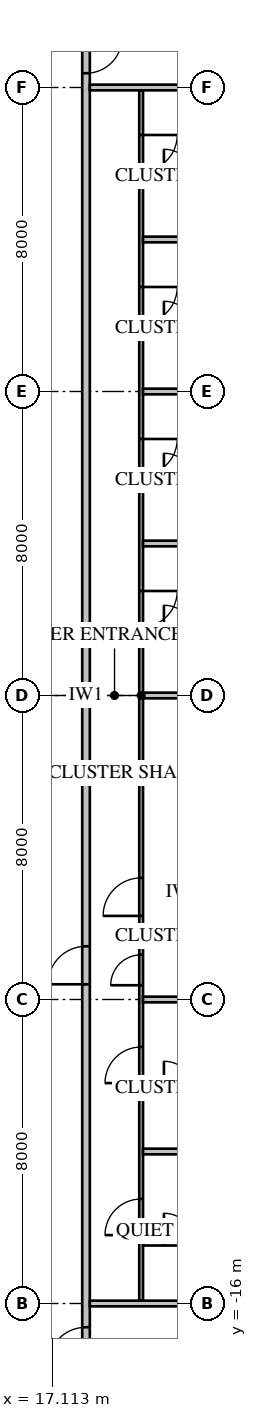
"""IFC4 building model, lengths in metres.
Left out: names, types, materials, properties, quantities, classifications, styles, units other than length and angle.
Written with IfcOpenShell. Run it as: python <this file> out.ifc"""

import sys

from ifc_helpers import new_model, si_unit, direction, frame, frame_2d, origin, place, context, subcontext, project, spatial, rectangle, extrude, element, fill, save


model = new_model("IFC4")
c1 = context("Model", 3, precision=1e-05, world=origin(), true_north=direction((0.0, 1.0)))
c2 = subcontext(c1, "Body", "Model", "MODEL_VIEW")
j1 = project(units=[si_unit("LENGTHUNIT", "METRE"), si_unit("PLANEANGLEUNIT", "RADIAN")], contexts=[c1])
p1 = place(None, origin())
s1 = spatial("IfcSite", under=j1, at=p1, CompositionType="ELEMENT")
p2 = place(p1, origin())
s2 = spatial("IfcBuilding", under=s1, at=p2, CompositionType="ELEMENT")
p3 = place(p2, frame((0.0, 0.0, 27.55)))
s3 = spatial("IfcBuildingStorey", under=s2, at=p3, CompositionType="ELEMENT", Elevation=27.55)
p4 = place(p3, frame((18.0, -18.0, 0.0), z_axis=(0.0, 0.0, 1.0), x_axis=(0.0, 1.0, 0.0)))
e1 = element("IfcWall", 1, at=p4, inside=s3, PredefinedType="PARTITIONING", context=c2, shape_type="SweptSolid", body=[
    extrude(rectangle(XDim=36.0, YDim=0.2, at=frame_2d((18.0, 0.0))), origin(), (0.0, 0.0, 1.0), 3.65),
])
p5 = place(p4, frame((10.4, 0.0, 0.0)))
e2 = element("IfcOpeningElement", 2, at=p5, cuts=e1, PredefinedType="OPENING", context=c2, shape_type="SweptSolid", body=[
    extrude(rectangle(XDim=1.0, YDim=2.1, at=frame_2d((0.5, 1.05))), frame((0.0, 0.12, 0.0), z_axis=(0.0, -1.0, 0.0), x_axis=(1.0, 0.0, 0.0)), (0.0, 0.0, 1.0), 0.24),
])
p6 = place(p4, frame((0.375, 0.0, 0.0)))
e3 = element("IfcOpeningElement", 3, at=p6, cuts=e1, PredefinedType="OPENING", context=c2, shape_type="SweptSolid", body=[
    extrude(rectangle(XDim=1.0, YDim=2.1, at=frame_2d((0.5, 1.05))), frame((0.0, 0.12, 0.0), z_axis=(0.0, -1.0, 0.0), x_axis=(1.0, 0.0, 0.0)), (0.0, 0.0, 1.0), 0.24),
])
p7 = place(p4, frame((34.375, 0.0, 0.0)))
e4 = element("IfcOpeningElement", 4, at=p7, cuts=e1, PredefinedType="OPENING", context=c2, shape_type="SweptSolid", body=[
    extrude(rectangle(XDim=0.95, YDim=2.1, at=frame_2d((0.475, 1.05))), frame((0.0, 0.12, 0.0), z_axis=(0.0, -1.0, 0.0), x_axis=(1.0, 0.0, 0.0)), (0.0, 0.0, 1.0), 0.24),
])
p8 = place(p3, frame((19.45, -15.925, 0.0), z_axis=(0.0, 0.0, 1.0), x_axis=(0.0, 1.0, 0.0)))
e5 = element("IfcWall", 5, at=p8, inside=s3, PredefinedType="PARTITIONING", context=c2, shape_type="SweptSolid", body=[
    extrude(rectangle(XDim=31.85, YDim=0.1, at=frame_2d((15.925, 0.0))), origin(), (0.0, 0.0, 1.0), 3.65),
])
p9 = place(p8, frame((10.125, 0.0, 0.0)))
e6 = element("IfcOpeningElement", 6, at=p9, cuts=e5, PredefinedType="OPENING", context=c2, shape_type="SweptSolid", body=[
    extrude(rectangle(XDim=1.0, YDim=2.1, at=frame_2d((0.5, 1.05))), frame((0.0, 0.07, 0.0), z_axis=(0.0, -1.0, 0.0), x_axis=(1.0, 0.0, 0.0)), (0.0, 0.0, 1.0), 0.14),
])
p10 = place(p8, frame((8.3, 0.0, 0.0)))
e7 = element("IfcOpeningElement", 7, at=p10, cuts=e5, PredefinedType="OPENING", context=c2, shape_type="SweptSolid", body=[
    extrude(rectangle(XDim=0.8, YDim=2.1, at=frame_2d((0.4, 1.05))), frame((0.0, 0.07, 0.0), z_axis=(0.0, -1.0, 0.0), x_axis=(1.0, 0.0, 0.0)), (0.0, 0.0, 1.0), 0.14),
])
p11 = place(p8, frame((1.725, 0.0, 0.0)))
e8 = element("IfcOpeningElement", 8, at=p11, cuts=e5, PredefinedType="OPENING", context=c2, shape_type="SweptSolid", body=[
    extrude(rectangle(XDim=0.95, YDim=2.1, at=frame_2d((0.475, 1.05))), frame((0.0, 0.07, 0.0), z_axis=(0.0, -1.0, 0.0), x_axis=(1.0, 0.0, 0.0)), (0.0, 0.0, 1.0), 0.14),
])
p12 = place(p8, frame((5.725, 0.0, 0.0)))
e9 = element("IfcOpeningElement", 9, at=p12, cuts=e5, PredefinedType="OPENING", context=c2, shape_type="SweptSolid", body=[
    extrude(rectangle(XDim=0.95, YDim=2.1, at=frame_2d((0.475, 1.05))), frame((0.0, 0.07, 0.0), z_axis=(0.0, -1.0, 0.0), x_axis=(1.0, 0.0, 0.0)), (0.0, 0.0, 1.0), 0.14),
])
p13 = place(p8, frame((17.725, 0.0, 0.0)))
e10 = element("IfcOpeningElement", 10, at=p13, cuts=e5, PredefinedType="OPENING", context=c2, shape_type="SweptSolid", body=[
    extrude(rectangle(XDim=0.95, YDim=2.1, at=frame_2d((0.475, 1.05))), frame((0.0, 0.07, 0.0), z_axis=(0.0, -1.0, 0.0), x_axis=(1.0, 0.0, 0.0)), (0.0, 0.0, 1.0), 0.14),
])
p14 = place(p8, frame((21.725, 0.0, 0.0)))
e11 = element("IfcOpeningElement", 11, at=p14, cuts=e5, PredefinedType="OPENING", context=c2, shape_type="SweptSolid", body=[
    extrude(rectangle(XDim=0.95, YDim=2.1, at=frame_2d((0.475, 1.05))), frame((0.0, 0.07, 0.0), z_axis=(0.0, -1.0, 0.0), x_axis=(1.0, 0.0, 0.0)), (0.0, 0.0, 1.0), 0.14),
])
p15 = place(p8, frame((25.725, 0.0, 0.0)))
e12 = element("IfcOpeningElement", 12, at=p15, cuts=e5, PredefinedType="OPENING", context=c2, shape_type="SweptSolid", body=[
    extrude(rectangle(XDim=0.95, YDim=2.1, at=frame_2d((0.475, 1.05))), frame((0.0, 0.07, 0.0), z_axis=(0.0, -1.0, 0.0), x_axis=(1.0, 0.0, 0.0)), (0.0, 0.0, 1.0), 0.14),
])
p16 = place(p8, frame((29.725, 0.0, 0.0)))
e13 = element("IfcOpeningElement", 13, at=p16, cuts=e5, PredefinedType="OPENING", context=c2, shape_type="SweptSolid", body=[
    extrude(rectangle(XDim=0.95, YDim=2.1, at=frame_2d((0.475, 1.05))), frame((0.0, 0.07, 0.0), z_axis=(0.0, -1.0, 0.0), x_axis=(1.0, 0.0, 0.0)), (0.0, 0.0, 1.0), 0.14),
])
p17 = place(p3, frame((19.5, -6.275, 0.0), z_axis=(0.0, 0.0, 1.0), x_axis=(1.0, 0.0, 0.0)))
e14 = element("IfcWall", 14, at=p17, inside=s3, PredefinedType="PARTITIONING", context=c2, shape_type="SweptSolid", body=[
    extrude(rectangle(XDim=2.1, YDim=0.1, at=frame_2d((1.05, 0.0))), origin(), (0.0, 0.0, 1.0), 3.65),
])
p18 = place(p3, frame((18.1, -16.0, 0.0), z_axis=(0.0, 0.0, 1.0), x_axis=(1.0, 0.0, 0.0)))
e15 = element("IfcWall", 15, at=p18, inside=s3, PredefinedType="PARTITIONING", context=c2, shape_type="SweptSolid", body=[
    extrude(rectangle(XDim=6.589, YDim=0.15, at=frame_2d((3.295, 0.0))), origin(), (0.0, 0.0, 1.0), 3.65),
])
for number, where, z_axis, x_axis in (
    (16, (19.5, -12.0, 0.0), (0.0, 0.0, 1.0), (1.0, 0.0, 0.0)),
    (17, (19.5, -8.0, 0.0), (0.0, 0.0, 1.0), (1.0, 0.0, 0.0)),
):
    element("IfcWall", number, at=place(p3, frame(where, z_axis=z_axis, x_axis=x_axis)), inside=s3, PredefinedType="PARTITIONING", context=c2, shape_type="SweptSolid", body=[
        extrude(rectangle(XDim=5.2, YDim=0.15, at=frame_2d((2.6, 0.0))), origin(), (0.0, 0.0, 1.0), 3.65),
    ])
p19 = place(p3, frame((19.5, 0.0, 0.0), z_axis=(0.0, 0.0, 1.0), x_axis=(1.0, 0.0, 0.0)))
e18 = element("IfcWall", 18, at=p19, inside=s3, PredefinedType="PARTITIONING", context=c2, shape_type="SweptSolid", body=[
    extrude(rectangle(XDim=5.2, YDim=0.15, at=frame_2d((2.6, 0.0))), origin(), (0.0, 0.0, 1.0), 2.957),
])
for number, where, z_axis, x_axis in (
    (19, (19.5, 4.0, 0.0), (0.0, 0.0, 1.0), (1.0, 0.0, 0.0)),
    (20, (19.5, 8.0, 0.0), (0.0, 0.0, 1.0), (1.0, 0.0, 0.0)),
    (21, (19.5, 12.0, 0.0), (0.0, 0.0, 1.0), (1.0, 0.0, 0.0)),
):
    element("IfcWall", number, at=place(p3, frame(where, z_axis=z_axis, x_axis=x_axis)), inside=s3, PredefinedType="PARTITIONING", context=c2, shape_type="SweptSolid", body=[
        extrude(rectangle(XDim=5.2, YDim=0.15, at=frame_2d((2.6, 0.0))), origin(), (0.0, 0.0, 1.0), 3.65),
    ])
p20 = place(p3, frame((18.1, 16.0, 0.0), z_axis=(0.0, 0.0, 1.0), x_axis=(1.0, 0.0, 0.0)))
e22 = element("IfcWall", 22, at=p20, inside=s3, PredefinedType="PARTITIONING", context=c2, shape_type="SweptSolid", body=[
    extrude(rectangle(XDim=6.589, YDim=0.15, at=frame_2d((3.295, 0.0))), origin(), (0.0, 0.0, 1.0), 3.65),
])
p21 = place(p3, frame((19.5, -14.425, 0.0), z_axis=(0.0, 0.0, 1.0), x_axis=(1.0, 0.0, 0.0)))
e23 = element("IfcWall", 23, at=p21, inside=s3, PredefinedType="PARTITIONING", context=c2, shape_type="SweptSolid", body=[
    extrude(rectangle(XDim=2.7, YDim=0.1, at=frame_2d((1.35, 0.0))), origin(), (0.0, 0.0, 1.0), 3.65),
])
p22 = place(p21, frame((0.55, 0.0, 0.0)))
e24 = element("IfcOpeningElement", 24, at=p22, cuts=e23, PredefinedType="OPENING", context=c2, shape_type="SweptSolid", body=[
    extrude(rectangle(XDim=0.8, YDim=2.1, at=frame_2d((0.4, 1.05))), frame((0.0, 0.07, 0.0), z_axis=(0.0, -1.0, 0.0), x_axis=(1.0, 0.0, 0.0)), (0.0, 0.0, 1.0), 0.14),
])
p23 = place(p3, frame((19.5, -10.425, 0.0), z_axis=(0.0, 0.0, 1.0), x_axis=(1.0, 0.0, 0.0)))
e25 = element("IfcWall", 25, at=p23, inside=s3, PredefinedType="PARTITIONING", context=c2, shape_type="SweptSolid", body=[
    extrude(rectangle(XDim=2.7, YDim=0.1, at=frame_2d((1.35, 0.0))), origin(), (0.0, 0.0, 1.0), 3.65),
])
p24 = place(p23, frame((0.55, 0.0, 0.0)))
e26 = element("IfcOpeningElement", 26, at=p24, cuts=e25, PredefinedType="OPENING", context=c2, shape_type="SweptSolid", body=[
    extrude(rectangle(XDim=0.8, YDim=2.1, at=frame_2d((0.4, 1.05))), frame((0.0, 0.07, 0.0), z_axis=(0.0, -1.0, 0.0), x_axis=(1.0, 0.0, 0.0)), (0.0, 0.0, 1.0), 0.14),
])
p25 = place(p3, frame((19.5, 1.575, 0.0), z_axis=(0.0, 0.0, 1.0), x_axis=(1.0, 0.0, 0.0)))
e27 = element("IfcWall", 27, at=p25, inside=s3, PredefinedType="PARTITIONING", context=c2, shape_type="SweptSolid", body=[
    extrude(rectangle(XDim=2.7, YDim=0.1, at=frame_2d((1.35, 0.0))), origin(), (0.0, 0.0, 1.0), 3.65),
])
p26 = place(p25, frame((0.55, 0.0, 0.0)))
e28 = element("IfcOpeningElement", 28, at=p26, cuts=e27, PredefinedType="OPENING", context=c2, shape_type="SweptSolid", body=[
    extrude(rectangle(XDim=0.8, YDim=2.1, at=frame_2d((0.4, 1.05))), frame((0.0, 0.07, 0.0), z_axis=(0.0, -1.0, 0.0), x_axis=(1.0, 0.0, 0.0)), (0.0, 0.0, 1.0), 0.14),
])
p27 = place(p3, frame((19.5, 5.575, 0.0), z_axis=(0.0, 0.0, 1.0), x_axis=(1.0, 0.0, 0.0)))
e29 = element("IfcWall", 29, at=p27, inside=s3, PredefinedType="PARTITIONING", context=c2, shape_type="SweptSolid", body=[
    extrude(rectangle(XDim=2.7, YDim=0.1, at=frame_2d((1.35, 0.0))), origin(), (0.0, 0.0, 1.0), 3.65),
])
p28 = place(p27, frame((0.55, 0.0, 0.0)))
e30 = element("IfcOpeningElement", 30, at=p28, cuts=e29, PredefinedType="OPENING", context=c2, shape_type="SweptSolid", body=[
    extrude(rectangle(XDim=0.8, YDim=2.1, at=frame_2d((0.4, 1.05))), frame((0.0, 0.07, 0.0), z_axis=(0.0, -1.0, 0.0), x_axis=(1.0, 0.0, 0.0)), (0.0, 0.0, 1.0), 0.14),
])
p29 = place(p3, frame((19.5, 9.575, 0.0), z_axis=(0.0, 0.0, 1.0), x_axis=(1.0, 0.0, 0.0)))
e31 = element("IfcWall", 31, at=p29, inside=s3, PredefinedType="PARTITIONING", context=c2, shape_type="SweptSolid", body=[
    extrude(rectangle(XDim=2.7, YDim=0.1, at=frame_2d((1.35, 0.0))), origin(), (0.0, 0.0, 1.0), 3.65),
])
p30 = place(p29, frame((0.55, 0.0, 0.0)))
e32 = element("IfcOpeningElement", 32, at=p30, cuts=e31, PredefinedType="OPENING", context=c2, shape_type="SweptSolid", body=[
    extrude(rectangle(XDim=0.8, YDim=2.1, at=frame_2d((0.4, 1.05))), frame((0.0, 0.07, 0.0), z_axis=(0.0, -1.0, 0.0), x_axis=(1.0, 0.0, 0.0)), (0.0, 0.0, 1.0), 0.14),
])
p31 = place(p3, frame((19.5, 13.575, 0.0), z_axis=(0.0, 0.0, 1.0), x_axis=(1.0, 0.0, 0.0)))
e33 = element("IfcWall", 33, at=p31, inside=s3, PredefinedType="PARTITIONING", context=c2, shape_type="SweptSolid", body=[
    extrude(rectangle(XDim=2.7, YDim=0.1, at=frame_2d((1.35, 0.0))), origin(), (0.0, 0.0, 1.0), 3.65),
])
p32 = place(p31, frame((0.55, 0.0, 0.0)))
e34 = element("IfcOpeningElement", 34, at=p32, cuts=e33, PredefinedType="OPENING", context=c2, shape_type="SweptSolid", body=[
    extrude(rectangle(XDim=0.8, YDim=2.1, at=frame_2d((0.4, 1.05))), frame((0.0, 0.07, 0.0), z_axis=(0.0, -1.0, 0.0), x_axis=(1.0, 0.0, 0.0)), (0.0, 0.0, 1.0), 0.14),
])
p33 = place(p5, origin())
e35 = element("IfcDoor", 35, at=p33, inside=s3, OperationType="SINGLE_SWING_LEFT", PredefinedType="DOOR", context=c2, shape_type="SweptSolid", body=[
    extrude(rectangle(XDim=1.0, YDim=2.1, at=frame_2d((0.5, 1.05))), frame((0.0, 0.025, 0.0), z_axis=(0.0, -1.0, 0.0), x_axis=(1.0, 0.0, 0.0)), (0.0, 0.0, 1.0), 0.05),
])
fill(e2, e35)
p34 = place(p9, origin())
e36 = element("IfcDoor", 36, at=p34, inside=s3, OperationType="SINGLE_SWING_LEFT", PredefinedType="DOOR", context=c2, shape_type="SweptSolid", body=[
    extrude(rectangle(XDim=1.0, YDim=2.1, at=frame_2d((0.5, 1.05))), frame((0.0, 0.025, 0.0), z_axis=(0.0, -1.0, 0.0), x_axis=(1.0, 0.0, 0.0)), (0.0, 0.0, 1.0), 0.05),
])
fill(e6, e36)
p35 = place(p10, origin())
e37 = element("IfcDoor", 37, at=p35, inside=s3, OperationType="SINGLE_SWING_LEFT", PredefinedType="DOOR", context=c2, shape_type="SweptSolid", body=[
    extrude(rectangle(XDim=0.8, YDim=2.1, at=frame_2d((0.4, 1.05))), frame((0.0, 0.025, 0.0), z_axis=(0.0, -1.0, 0.0), x_axis=(1.0, 0.0, 0.0)), (0.0, 0.0, 1.0), 0.05),
])
fill(e7, e37)
p36 = place(p6, origin())
e38 = element("IfcDoor", 38, at=p36, inside=s3, OperationType="SINGLE_SWING_LEFT", PredefinedType="DOOR", context=c2, shape_type="SweptSolid", body=[
    extrude(rectangle(XDim=1.0, YDim=2.1, at=frame_2d((0.5, 1.05))), frame((0.0, 0.025, 0.0), z_axis=(0.0, -1.0, 0.0), x_axis=(1.0, 0.0, 0.0)), (0.0, 0.0, 1.0), 0.05),
])
fill(e3, e38)
p37 = place(p11, origin())
e39 = element("IfcDoor", 39, at=p37, inside=s3, OperationType="SINGLE_SWING_LEFT", PredefinedType="DOOR", context=c2, shape_type="SweptSolid", body=[
    extrude(rectangle(XDim=0.95, YDim=2.1, at=frame_2d((0.475, 1.05))), frame((0.0, 0.025, 0.0), z_axis=(0.0, -1.0, 0.0), x_axis=(1.0, 0.0, 0.0)), (0.0, 0.0, 1.0), 0.05),
])
fill(e8, e39)
p38 = place(p22, origin())
e40 = element("IfcDoor", 40, at=p38, inside=s3, OperationType="SINGLE_SWING_LEFT", PredefinedType="DOOR", context=c2, shape_type="SweptSolid", body=[
    extrude(rectangle(XDim=0.8, YDim=2.1, at=frame_2d((0.4, 1.05))), frame((0.0, 0.025, 0.0), z_axis=(0.0, -1.0, 0.0), x_axis=(1.0, 0.0, 0.0)), (0.0, 0.0, 1.0), 0.05),
])
fill(e24, e40)
p39 = place(p12, origin())
e41 = element("IfcDoor", 41, at=p39, inside=s3, OperationType="SINGLE_SWING_LEFT", PredefinedType="DOOR", context=c2, shape_type="SweptSolid", body=[
    extrude(rectangle(XDim=0.95, YDim=2.1, at=frame_2d((0.475, 1.05))), frame((0.0, 0.025, 0.0), z_axis=(0.0, -1.0, 0.0), x_axis=(1.0, 0.0, 0.0)), (0.0, 0.0, 1.0), 0.05),
])
fill(e9, e41)
p40 = place(p24, origin())
e42 = element("IfcDoor", 42, at=p40, inside=s3, OperationType="SINGLE_SWING_LEFT", PredefinedType="DOOR", context=c2, shape_type="SweptSolid", body=[
    extrude(rectangle(XDim=0.8, YDim=2.1, at=frame_2d((0.4, 1.05))), frame((0.0, 0.025, 0.0), z_axis=(0.0, -1.0, 0.0), x_axis=(1.0, 0.0, 0.0)), (0.0, 0.0, 1.0), 0.05),
])
fill(e26, e42)
p41 = place(p13, origin())
e43 = element("IfcDoor", 43, at=p41, inside=s3, OperationType="SINGLE_SWING_RIGHT", PredefinedType="DOOR", context=c2, shape_type="SweptSolid", body=[
    extrude(rectangle(XDim=0.95, YDim=2.1, at=frame_2d((0.475, 1.05))), frame((0.0, 0.025, 0.0), z_axis=(0.0, -1.0, 0.0), x_axis=(1.0, 0.0, 0.0)), (0.0, 0.0, 1.0), 0.05),
])
fill(e10, e43)
p42 = place(p26, origin())
e44 = element("IfcDoor", 44, at=p42, inside=s3, OperationType="SINGLE_SWING_LEFT", PredefinedType="DOOR", context=c2, shape_type="SweptSolid", body=[
    extrude(rectangle(XDim=0.8, YDim=2.1, at=frame_2d((0.4, 1.05))), frame((0.0, 0.025, 0.0), z_axis=(0.0, -1.0, 0.0), x_axis=(1.0, 0.0, 0.0)), (0.0, 0.0, 1.0), 0.05),
])
fill(e28, e44)
p43 = place(p14, origin())
e45 = element("IfcDoor", 45, at=p43, inside=s3, OperationType="SINGLE_SWING_RIGHT", PredefinedType="DOOR", context=c2, shape_type="SweptSolid", body=[
    extrude(rectangle(XDim=0.95, YDim=2.1, at=frame_2d((0.475, 1.05))), frame((0.0, 0.025, 0.0), z_axis=(0.0, -1.0, 0.0), x_axis=(1.0, 0.0, 0.0)), (0.0, 0.0, 1.0), 0.05),
])
fill(e11, e45)
p44 = place(p28, origin())
e46 = element("IfcDoor", 46, at=p44, inside=s3, OperationType="SINGLE_SWING_LEFT", PredefinedType="DOOR", context=c2, shape_type="SweptSolid", body=[
    extrude(rectangle(XDim=0.8, YDim=2.1, at=frame_2d((0.4, 1.05))), frame((0.0, 0.025, 0.0), z_axis=(0.0, -1.0, 0.0), x_axis=(1.0, 0.0, 0.0)), (0.0, 0.0, 1.0), 0.05),
])
fill(e30, e46)
p45 = place(p15, origin())
e47 = element("IfcDoor", 47, at=p45, inside=s3, OperationType="SINGLE_SWING_RIGHT", PredefinedType="DOOR", context=c2, shape_type="SweptSolid", body=[
    extrude(rectangle(XDim=0.95, YDim=2.1, at=frame_2d((0.475, 1.05))), frame((0.0, 0.025, 0.0), z_axis=(0.0, -1.0, 0.0), x_axis=(1.0, 0.0, 0.0)), (0.0, 0.0, 1.0), 0.05),
])
fill(e12, e47)
p46 = place(p30, origin())
e48 = element("IfcDoor", 48, at=p46, inside=s3, OperationType="SINGLE_SWING_LEFT", PredefinedType="DOOR", context=c2, shape_type="SweptSolid", body=[
    extrude(rectangle(XDim=0.8, YDim=2.1, at=frame_2d((0.4, 1.05))), frame((0.0, 0.025, 0.0), z_axis=(0.0, -1.0, 0.0), x_axis=(1.0, 0.0, 0.0)), (0.0, 0.0, 1.0), 0.05),
])
fill(e32, e48)
p47 = place(p16, origin())
e49 = element("IfcDoor", 49, at=p47, inside=s3, OperationType="SINGLE_SWING_RIGHT", PredefinedType="DOOR", context=c2, shape_type="SweptSolid", body=[
    extrude(rectangle(XDim=0.95, YDim=2.1, at=frame_2d((0.475, 1.05))), frame((0.0, 0.025, 0.0), z_axis=(0.0, -1.0, 0.0), x_axis=(1.0, 0.0, 0.0)), (0.0, 0.0, 1.0), 0.05),
])
fill(e13, e49)
p48 = place(p32, origin())
e50 = element("IfcDoor", 50, at=p48, inside=s3, OperationType="SINGLE_SWING_LEFT", PredefinedType="DOOR", context=c2, shape_type="SweptSolid", body=[
    extrude(rectangle(XDim=0.8, YDim=2.1, at=frame_2d((0.4, 1.05))), frame((0.0, 0.025, 0.0), z_axis=(0.0, -1.0, 0.0), x_axis=(1.0, 0.0, 0.0)), (0.0, 0.0, 1.0), 0.05),
])
fill(e34, e50)
p49 = place(p7, origin())
e51 = element("IfcDoor", 51, at=p49, inside=s3, OperationType="SINGLE_SWING_RIGHT", PredefinedType="DOOR", context=c2, shape_type="SweptSolid", body=[
    extrude(rectangle(XDim=0.95, YDim=2.1, at=frame_2d((0.475, 1.05))), frame((0.0, 0.025, 0.0), z_axis=(0.0, -1.0, 0.0), x_axis=(1.0, 0.0, 0.0)), (0.0, 0.0, 1.0), 0.05),
])
fill(e4, e51)
save(model, sys.argv[1])
